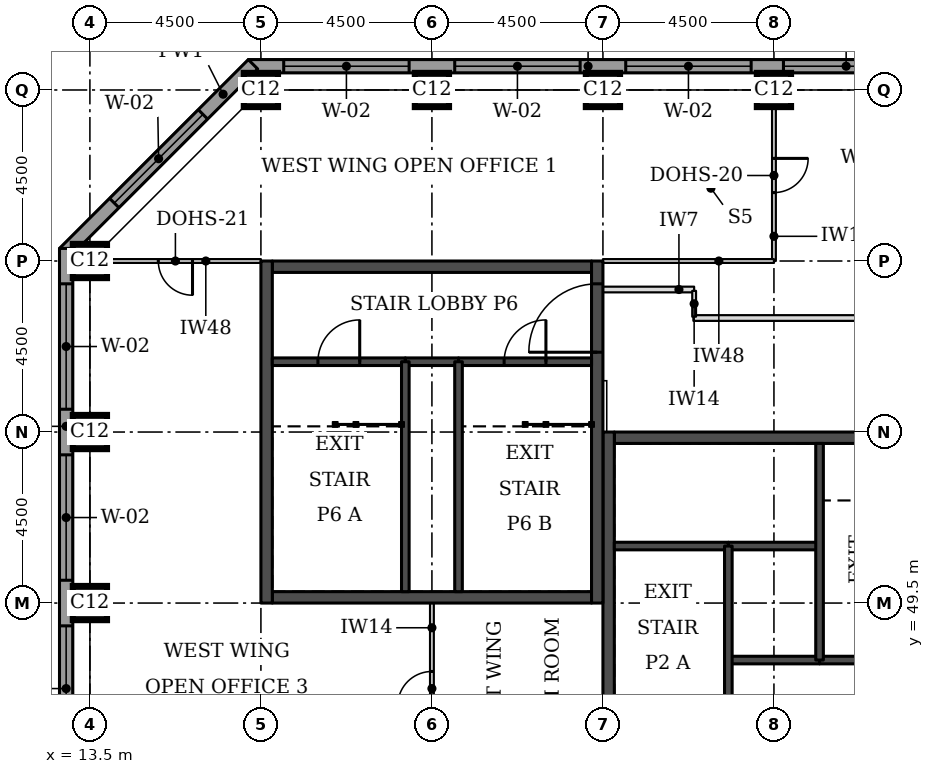
"""IFC4 building model, lengths in metres.
Left out: names, types, materials, properties, quantities, classifications, styles, units other than length and angle.
Written with IfcOpenShell. Run it as: python <this file> out.ifc"""

import sys

from ifc_helpers import new_model, si_unit, direction, frame, frame_2d, origin, origin_2d, place, context, subcontext, project, spatial, rectangle, extrude, element, fill, save


model = new_model("IFC4")
c1 = context("Model", 3, precision=1e-05, world=origin(), true_north=direction((0.0, 1.0)))
c2 = subcontext(c1, "Body", "Model", "MODEL_VIEW")
j1 = project(units=[si_unit("LENGTHUNIT", "METRE"), si_unit("PLANEANGLEUNIT", "RADIAN")], contexts=[c1])
p1 = place(None, origin())
s1 = spatial("IfcSite", under=j1, at=p1, CompositionType="ELEMENT")
p2 = place(p1, origin())
s2 = spatial("IfcBuilding", under=s1, at=p2, CompositionType="ELEMENT")
p3 = place(p2, frame((0.0, 0.0, 260.0)))
s3 = spatial("IfcBuildingStorey", under=s2, at=p3, CompositionType="ELEMENT", Elevation=260.0)
for number, where, z_axis, x_axis in (
    (1, (13.5, 49.5, 0.0), (0.0, 0.0, 1.0), (1.0, 0.0, 0.0)),
    (2, (13.5, 54.0, 0.0), (0.0, 0.0, 1.0), (1.0, 0.0, 0.0)),
    (3, (13.5, 58.5, 0.0), (0.0, 0.0, 1.0), (1.0, 0.0, 0.0)),
    (4, (18.0, 63.0, 0.0), (0.0, 0.0, 1.0), (1.0, 0.0, 0.0)),
    (5, (22.5, 63.0, 0.0), (0.0, 0.0, 1.0), (1.0, 0.0, 0.0)),
    (6, (27.0, 63.0, 0.0), (0.0, 0.0, 1.0), (1.0, 0.0, 0.0)),
    (7, (31.5, 63.0, 0.0), (0.0, 0.0, 1.0), (1.0, 0.0, 0.0)),
):
    element("IfcColumn", number, at=place(p3, frame(where, z_axis=z_axis, x_axis=x_axis)), inside=s3, PredefinedType="COLUMN", context=c2, shape_type="SweptSolid", body=[
        extrude(rectangle(XDim=0.9, YDim=0.9, at=origin_2d()), origin(), (0.0, 0.0, 1.0), 3.7),
    ])
p4 = place(p3, frame((27.3, 53.85, 0.0), z_axis=(0.0, 0.0, 1.0), x_axis=(1.0, 0.0, 0.0)))
e8 = element("IfcWall", 8, at=p4, inside=s3, PredefinedType="SHEAR", context=c2, shape_type="SweptSolid", body=[
    extrude(rectangle(XDim=8.4, YDim=0.3, at=frame_2d((4.2, 0.0))), origin(), (0.0, 0.0, 1.0), 3.7),
])
p5 = place(p4, frame((6.4, 0.0, 0.0)))
e9 = element("IfcOpeningElement", 9, at=p5, cuts=e8, PredefinedType="OPENING", context=c2, shape_type="SweptSolid", body=[
    extrude(rectangle(XDim=1.1, YDim=2.1, at=frame_2d((0.55, 1.05))), frame((0.0, 0.16, 0.0), z_axis=(0.0, -1.0, 0.0), x_axis=(1.0, 0.0, 0.0)), (0.0, 0.0, 1.0), 0.32),
])
p6 = place(p3, frame((27.15, 45.0, 0.0), z_axis=(0.0, 0.0, 1.0), x_axis=(0.0, 1.0, 0.0)))
e10 = element("IfcWall", 10, at=p6, inside=s3, PredefinedType="SHEAR", context=c2, shape_type="SweptSolid", body=[
    extrude(rectangle(XDim=9.0, YDim=0.3, at=frame_2d((4.5, 0.0))), origin(), (0.0, 0.0, 1.0), 3.7),
])
p7 = place(p6, frame((0.4, 0.0, 0.0)))
e11 = element("IfcOpeningElement", 11, at=p7, cuts=e10, PredefinedType="OPENING", context=c2, shape_type="SweptSolid", body=[
    extrude(rectangle(XDim=1.1, YDim=2.1, at=frame_2d((0.55, 1.05))), frame((0.0, 0.16, 0.0), z_axis=(0.0, -1.0, 0.0), x_axis=(1.0, 0.0, 0.0)), (0.0, 0.0, 1.0), 0.32),
])
for number, where, z_axis, x_axis in (
    (12, (18.3, 49.65, 0.0), (0.0, 0.0, 1.0), (1.0, 0.0, 0.0)),
    (13, (18.3, 58.35, 0.0), (0.0, 0.0, 1.0), (1.0, 0.0, 0.0)),
):
    element("IfcWall", number, at=place(p3, frame(where, z_axis=z_axis, x_axis=x_axis)), inside=s3, PredefinedType="SHEAR", context=c2, shape_type="SweptSolid", body=[
        extrude(rectangle(XDim=8.4, YDim=0.3, at=frame_2d((4.2, 0.0))), origin(), (0.0, 0.0, 1.0), 3.7),
    ])
p8 = place(p3, frame((18.15, 49.5, 0.0), z_axis=(0.0, 0.0, 1.0), x_axis=(0.0, 1.0, 0.0)))
e14 = element("IfcWall", 14, at=p8, inside=s3, PredefinedType="SHEAR", context=c2, shape_type="SweptSolid", body=[
    extrude(rectangle(XDim=9.0, YDim=0.3, at=frame_2d((4.5, 0.0))), origin(), (0.0, 0.0, 1.0), 3.7),
])
p9 = place(p3, frame((26.85, 49.5, 0.0), z_axis=(0.0, 0.0, 1.0), x_axis=(0.0, 1.0, 0.0)))
e15 = element("IfcWall", 15, at=p9, inside=s3, PredefinedType="SHEAR", context=c2, shape_type="SweptSolid", body=[
    extrude(rectangle(XDim=9.0, YDim=0.3, at=frame_2d((4.5, 0.0))), origin(), (0.0, 0.0, 1.0), 3.7),
])
p10 = place(p9, frame((6.6, 0.0, 0.0)))
e16 = element("IfcOpeningElement", 16, at=p10, cuts=e15, PredefinedType="OPENING", context=c2, shape_type="SweptSolid", body=[
    extrude(rectangle(XDim=1.8, YDim=2.1, at=frame_2d((0.9, 1.05))), frame((0.0, 0.16, 0.0), z_axis=(0.0, -1.0, 0.0), x_axis=(1.0, 0.0, 0.0)), (0.0, 0.0, 1.0), 0.32),
])
p11 = place(p3, frame((35.55, 63.625, 0.0), z_axis=(0.0, 0.0, 1.0), x_axis=(-1.0, 0.0, 0.0)))
e17 = element("IfcWall", 17, at=p11, inside=s3, PredefinedType="STANDARD", context=c2, shape_type="SweptSolid", body=[
    extrude(rectangle(XDim=17.881, YDim=0.35, at=frame_2d((8.941, 0.0))), origin(), (0.0, 0.0, 1.0), 3.375),
])
p12 = place(p11, frame((0.5, 0.0, 0.9)))
e18 = element("IfcOpeningElement", 18, at=p12, cuts=e17, PredefinedType="OPENING", context=c2, shape_type="SweptSolid", body=[
    extrude(rectangle(XDim=3.3, YDim=1.9, at=frame_2d((1.65, 0.95))), frame((0.0, 0.185, 0.0), z_axis=(0.0, -1.0, 0.0), x_axis=(1.0, 0.0, 0.0)), (0.0, 0.0, 1.0), 0.37),
])
p13 = place(p11, frame((4.65, 0.0, 0.9)))
e19 = element("IfcOpeningElement", 19, at=p13, cuts=e17, PredefinedType="OPENING", context=c2, shape_type="SweptSolid", body=[
    extrude(rectangle(XDim=3.3, YDim=1.9, at=frame_2d((1.65, 0.95))), frame((0.0, 0.185, 0.0), z_axis=(0.0, -1.0, 0.0), x_axis=(1.0, 0.0, 0.0)), (0.0, 0.0, 1.0), 0.37),
])
p14 = place(p11, frame((9.15, 0.0, 0.9)))
e20 = element("IfcOpeningElement", 20, at=p14, cuts=e17, PredefinedType="OPENING", context=c2, shape_type="SweptSolid", body=[
    extrude(rectangle(XDim=3.3, YDim=1.9, at=frame_2d((1.65, 0.95))), frame((0.0, 0.185, 0.0), z_axis=(0.0, -1.0, 0.0), x_axis=(1.0, 0.0, 0.0)), (0.0, 0.0, 1.0), 0.37),
])
p15 = place(p11, frame((13.65, 0.0, 0.9)))
e21 = element("IfcOpeningElement", 21, at=p15, cuts=e17, PredefinedType="OPENING", context=c2, shape_type="SweptSolid", body=[
    extrude(rectangle(XDim=3.3, YDim=1.9, at=frame_2d((1.65, 0.95))), frame((0.0, 0.185, 0.0), z_axis=(0.0, -1.0, 0.0), x_axis=(1.0, 0.0, 0.0)), (0.0, 0.0, 1.0), 0.37),
])
p16 = place(p3, frame((17.792, 63.676, 0.0), z_axis=(0.0, 0.0, 1.0), x_axis=(-0.707106781187, -0.707106781187, 0.0)))
e22 = element("IfcWall", 22, at=p16, inside=s3, PredefinedType="STANDARD", context=c2, shape_type="SweptSolid", body=[
    extrude(rectangle(XDim=7.027, YDim=0.35, at=frame_2d((3.513, 0.0))), origin(), (0.0, 0.0, 1.0), 3.375),
])
p17 = place(p16, frame((1.863, 0.0, 0.9)))
e23 = element("IfcOpeningElement", 23, at=p17, cuts=e22, PredefinedType="OPENING", context=c2, shape_type="SweptSolid", body=[
    extrude(rectangle(XDim=3.3, YDim=1.9, at=frame_2d((1.65, 0.95))), frame((0.0, 0.185, 0.0), z_axis=(0.0, -1.0, 0.0), x_axis=(1.0, 0.0, 0.0)), (0.0, 0.0, 1.0), 0.37),
])
p18 = place(p3, frame((12.875, 58.831, 0.0), z_axis=(0.0, 0.0, 1.0), x_axis=(0.0, -1.0, 0.0)))
e24 = element("IfcWall", 24, at=p18, inside=s3, PredefinedType="STANDARD", context=c2, shape_type="SweptSolid", body=[
    extrude(rectangle(XDim=14.163, YDim=0.35, at=frame_2d((7.081, 0.0))), origin(), (0.0, 0.0, 1.0), 3.375),
])
p19 = place(p18, frame((0.931, 0.0, 0.9)))
e25 = element("IfcOpeningElement", 25, at=p19, cuts=e24, PredefinedType="OPENING", context=c2, shape_type="SweptSolid", body=[
    extrude(rectangle(XDim=3.3, YDim=1.9, at=frame_2d((1.65, 0.95))), frame((0.0, 0.185, 0.0), z_axis=(0.0, -1.0, 0.0), x_axis=(1.0, 0.0, 0.0)), (0.0, 0.0, 1.0), 0.37),
])
p20 = place(p18, frame((5.431, 0.0, 0.9)))
e26 = element("IfcOpeningElement", 26, at=p20, cuts=e24, PredefinedType="OPENING", context=c2, shape_type="SweptSolid", body=[
    extrude(rectangle(XDim=3.3, YDim=1.9, at=frame_2d((1.65, 0.95))), frame((0.0, 0.185, 0.0), z_axis=(0.0, -1.0, 0.0), x_axis=(1.0, 0.0, 0.0)), (0.0, 0.0, 1.0), 0.37),
])
p21 = place(p18, frame((9.931, 0.0, 0.9)))
e27 = element("IfcOpeningElement", 27, at=p21, cuts=e24, PredefinedType="OPENING", context=c2, shape_type="SweptSolid", body=[
    extrude(rectangle(XDim=3.3, YDim=1.9, at=frame_2d((1.65, 0.95))), frame((0.0, 0.185, 0.0), z_axis=(0.0, -1.0, 0.0), x_axis=(1.0, 0.0, 0.0)), (0.0, 0.0, 1.0), 0.37),
])
p22 = place(p3, frame((29.38, 57.0, 0.0), z_axis=(0.0, 0.0, 1.0), x_axis=(1.0, 0.0, 0.0)))
e28 = element("IfcWall", 28, at=p22, inside=s3, PredefinedType="PARTITIONING", context=c2, shape_type="SweptSolid", body=[
    extrude(rectangle(XDim=12.695, YDim=0.15, at=frame_2d((6.348, 0.0))), origin(), (0.0, 0.0, 1.0), 3.45),
])
p23 = place(p22, frame((5.13, 0.0, 0.0)))
e29 = element("IfcOpeningElement", 29, at=p23, cuts=e28, PredefinedType="OPENING", context=c2, shape_type="SweptSolid", body=[
    extrude(rectangle(XDim=1.0, YDim=2.1, at=frame_2d((0.5, 1.05))), frame((0.0, 0.085, 0.0), z_axis=(0.0, -1.0, 0.0), x_axis=(1.0, 0.0, 0.0)), (0.0, 0.0, 1.0), 0.17),
])
p24 = place(p3, frame((31.5, 63.0, 0.0), z_axis=(0.0, 0.0, 1.0), x_axis=(0.0, -1.0, 0.0)))
e30 = element("IfcWall", 30, at=p24, inside=s3, PredefinedType="PARTITIONING", context=c2, shape_type="SweptSolid", body=[
    extrude(rectangle(XDim=4.5, YDim=0.1, at=frame_2d((2.25, 0.0))), origin(), (0.0, 0.0, 1.0), 3.45),
])
p25 = place(p24, frame((1.8, 0.0, 0.0)))
e31 = element("IfcOpeningElement", 31, at=p25, cuts=e30, PredefinedType="OPENING", context=c2, shape_type="SweptSolid", body=[
    extrude(rectangle(XDim=0.9, YDim=2.1, at=frame_2d((0.45, 1.05))), frame((0.0, 0.06, 0.0), z_axis=(0.0, -1.0, 0.0), x_axis=(1.0, 0.0, 0.0)), (0.0, 0.0, 1.0), 0.12),
])
p26 = place(p3, frame((31.5, 58.5, 0.0), z_axis=(0.0, 0.0, 1.0), x_axis=(-1.0, 0.0, 0.0)))
e32 = element("IfcWall", 32, at=p26, inside=s3, PredefinedType="PARTITIONING", context=c2, shape_type="SweptSolid", body=[
    extrude(rectangle(XDim=4.5, YDim=0.1, at=frame_2d((2.25, 0.0))), origin(), (0.0, 0.0, 1.0), 2.4),
])
p27 = place(p3, frame((13.5, 58.5, 0.0), z_axis=(0.0, 0.0, 1.0), x_axis=(1.0, 0.0, 0.0)))
e33 = element("IfcWall", 33, at=p27, inside=s3, PredefinedType="PARTITIONING", context=c2, shape_type="SweptSolid", body=[
    extrude(rectangle(XDim=4.5, YDim=0.1, at=frame_2d((2.25, 0.0))), origin(), (0.0, 0.0, 1.0), 2.4),
])
p28 = place(p27, frame((1.8, 0.0, 0.0)))
e34 = element("IfcOpeningElement", 34, at=p28, cuts=e33, PredefinedType="OPENING", context=c2, shape_type="SweptSolid", body=[
    extrude(rectangle(XDim=0.9, YDim=2.1, at=frame_2d((0.45, 1.05))), frame((0.0, 0.06, 0.0), z_axis=(0.0, -1.0, 0.0), x_axis=(1.0, 0.0, 0.0)), (0.0, 0.0, 1.0), 0.12),
])
p29 = place(p3, frame((22.5, 49.5, 0.0), z_axis=(0.0, 0.0, 1.0), x_axis=(0.0, -1.0, 0.0)))
e35 = element("IfcWall", 35, at=p29, inside=s3, PredefinedType="PARTITIONING", context=c2, shape_type="SweptSolid", body=[
    extrude(rectangle(XDim=4.5, YDim=0.1, at=frame_2d((2.25, 0.0))), origin(), (0.0, 0.0, 1.0), 3.45),
])
p30 = place(p29, frame((1.8, 0.0, 0.0)))
e36 = element("IfcOpeningElement", 36, at=p30, cuts=e35, PredefinedType="OPENING", context=c2, shape_type="SweptSolid", body=[
    extrude(rectangle(XDim=0.9, YDim=2.1, at=frame_2d((0.45, 1.05))), frame((0.0, 0.06, 0.0), z_axis=(0.0, -1.0, 0.0), x_axis=(1.0, 0.0, 0.0)), (0.0, 0.0, 1.0), 0.12),
])
p31 = place(p3, frame((27.0, 57.75, 0.0), z_axis=(0.0, 0.0, 1.0), x_axis=(1.0, 0.0, 0.0)))
e37 = element("IfcWall", 37, at=p31, inside=s3, PredefinedType="PARTITIONING", context=c2, shape_type="SweptSolid", body=[
    extrude(rectangle(XDim=2.4, YDim=0.15, at=frame_2d((1.2, 0.0))), origin(), (0.0, 0.0, 1.0), 3.45),
])
p32 = place(p3, frame((29.4, 57.715, 0.0), z_axis=(0.0, 0.0, 1.0), x_axis=(0.0, -1.0, 0.0)))
e38 = element("IfcWall", 38, at=p32, inside=s3, PredefinedType="PARTITIONING", context=c2, shape_type="SweptSolid", body=[
    extrude(rectangle(XDim=0.68, YDim=0.1, at=frame_2d((0.34, 0.0))), origin(), (0.0, 0.0, 1.0), 3.45),
])
p33 = place(p3, frame((30.3, 48.0, 0.0), z_axis=(0.0, 0.0, 1.0), x_axis=(1.0, 0.0, 0.0)))
e39 = element("IfcWall", 39, at=p33, inside=s3, PredefinedType="SOLIDWALL", context=c2, shape_type="SweptSolid", body=[
    extrude(rectangle(XDim=2.4, YDim=0.2, at=frame_2d((1.2, 0.0))), origin(), (0.0, 0.0, 1.0), 3.45),
])
p34 = place(p3, frame((32.7, 48.0, 0.0), z_axis=(0.0, 0.0, 1.0), x_axis=(1.0, 0.0, 0.0)))
e40 = element("IfcWall", 40, at=p34, inside=s3, PredefinedType="SOLIDWALL", context=c2, shape_type="SweptSolid", body=[
    extrude(rectangle(XDim=3.0, YDim=0.2, at=frame_2d((1.5, 0.0))), origin(), (0.0, 0.0, 1.0), 3.45),
])
p35 = place(p3, frame((30.3, 51.0, 0.0), z_axis=(0.0, 0.0, 1.0), x_axis=(1.0, 0.0, 0.0)))
e41 = element("IfcWall", 41, at=p35, inside=s3, PredefinedType="SOLIDWALL", context=c2, shape_type="SweptSolid", body=[
    extrude(rectangle(XDim=2.4, YDim=0.2, at=frame_2d((1.2, 0.0))), origin(), (0.0, 0.0, 1.0), 3.45),
])
p36 = place(p3, frame((27.3, 51.0, 0.0), z_axis=(0.0, 0.0, 1.0), x_axis=(1.0, 0.0, 0.0)))
e42 = element("IfcWall", 42, at=p36, inside=s3, PredefinedType="SOLIDWALL", context=c2, shape_type="SweptSolid", body=[
    extrude(rectangle(XDim=3.0, YDim=0.2, at=frame_2d((1.5, 0.0))), origin(), (0.0, 0.0, 1.0), 3.45),
])
for number, where, z_axis, x_axis in (
    (43, (30.3, 45.3, 0.0), (0.0, 0.0, 1.0), (0.0, 1.0, 0.0)),
    (44, (32.7, 48.0, 0.0), (0.0, 0.0, 1.0), (0.0, 1.0, 0.0)),
):
    element("IfcWall", number, at=place(p3, frame(where, z_axis=z_axis, x_axis=x_axis)), inside=s3, PredefinedType="SOLIDWALL", context=c2, shape_type="SweptSolid", body=[
        extrude(rectangle(XDim=5.7, YDim=0.2, at=frame_2d((2.85, 0.0))), origin(), (0.0, 0.0, 1.0), 3.45),
    ])
p37 = place(p3, frame((21.8, 55.85, 0.0), z_axis=(0.0, 0.0, 1.0), x_axis=(1.0, 0.0, 0.0)))
e45 = element("IfcWall", 45, at=p37, inside=s3, PredefinedType="SOLIDWALL", context=c2, shape_type="SweptSolid", body=[
    extrude(rectangle(XDim=1.4, YDim=0.2, at=frame_2d((0.7, 0.0))), origin(), (0.0, 0.0, 1.0), 3.45),
])
p38 = place(p3, frame((18.3, 55.85, 0.0), z_axis=(0.0, 0.0, 1.0), x_axis=(1.0, 0.0, 0.0)))
e46 = element("IfcWall", 46, at=p38, inside=s3, PredefinedType="SOLIDWALL", context=c2, shape_type="SweptSolid", body=[
    extrude(rectangle(XDim=3.5, YDim=0.2, at=frame_2d((1.75, 0.0))), origin(), (0.0, 0.0, 1.0), 3.45),
])
p39 = place(p38, frame((1.2, 0.0, 0.0)))
e47 = element("IfcOpeningElement", 47, at=p39, cuts=e46, PredefinedType="OPENING", context=c2, shape_type="SweptSolid", body=[
    extrude(rectangle(XDim=1.1, YDim=2.1, at=frame_2d((0.55, 1.05))), frame((0.0, 0.11, 0.0), z_axis=(0.0, -1.0, 0.0), x_axis=(1.0, 0.0, 0.0)), (0.0, 0.0, 1.0), 0.22),
])
p40 = place(p3, frame((23.2, 55.85, 0.0), z_axis=(0.0, 0.0, 1.0), x_axis=(1.0, 0.0, 0.0)))
e48 = element("IfcWall", 48, at=p40, inside=s3, PredefinedType="SOLIDWALL", context=c2, shape_type="SweptSolid", body=[
    extrude(rectangle(XDim=3.5, YDim=0.2, at=frame_2d((1.75, 0.0))), origin(), (0.0, 0.0, 1.0), 3.45),
])
p41 = place(p40, frame((1.2, 0.0, 0.0)))
e49 = element("IfcOpeningElement", 49, at=p41, cuts=e48, PredefinedType="OPENING", context=c2, shape_type="SweptSolid", body=[
    extrude(rectangle(XDim=1.1, YDim=2.1, at=frame_2d((0.55, 1.05))), frame((0.0, 0.11, 0.0), z_axis=(0.0, -1.0, 0.0), x_axis=(1.0, 0.0, 0.0)), (0.0, 0.0, 1.0), 0.22),
])
for number, where, z_axis, x_axis in (
    (50, (21.8, 49.8, 0.0), (0.0, 0.0, 1.0), (0.0, 1.0, 0.0)),
    (51, (23.2, 49.8, 0.0), (0.0, 0.0, 1.0), (0.0, 1.0, 0.0)),
):
    element("IfcWall", number, at=place(p3, frame(where, z_axis=z_axis, x_axis=x_axis)), inside=s3, PredefinedType="SOLIDWALL", context=c2, shape_type="SweptSolid", body=[
        extrude(rectangle(XDim=6.05, YDim=0.2, at=frame_2d((3.025, 0.0))), origin(), (0.0, 0.0, 1.0), 3.45),
    ])
p42 = place(p12, origin())
e52 = element("IfcWindow", 52, at=p42, inside=s3, PartitioningType="SINGLE_PANEL", PredefinedType="WINDOW", context=c2, shape_type="SweptSolid", body=[
    extrude(rectangle(XDim=3.3, YDim=1.9, at=frame_2d((1.65, 0.95))), frame((0.0, 0.085, 0.0), z_axis=(0.0, -1.0, 0.0), x_axis=(1.0, 0.0, 0.0)), (0.0, 0.0, 1.0), 0.06),
])
fill(e18, e52)
p43 = place(p13, origin())
e53 = element("IfcWindow", 53, at=p43, inside=s3, PartitioningType="SINGLE_PANEL", PredefinedType="WINDOW", context=c2, shape_type="SweptSolid", body=[
    extrude(rectangle(XDim=3.3, YDim=1.9, at=frame_2d((1.65, 0.95))), frame((0.0, 0.085, 0.0), z_axis=(0.0, -1.0, 0.0), x_axis=(1.0, 0.0, 0.0)), (0.0, 0.0, 1.0), 0.06),
])
fill(e19, e53)
p44 = place(p14, origin())
e54 = element("IfcWindow", 54, at=p44, inside=s3, PartitioningType="SINGLE_PANEL", PredefinedType="WINDOW", context=c2, shape_type="SweptSolid", body=[
    extrude(rectangle(XDim=3.3, YDim=1.9, at=frame_2d((1.65, 0.95))), frame((0.0, 0.085, 0.0), z_axis=(0.0, -1.0, 0.0), x_axis=(1.0, 0.0, 0.0)), (0.0, 0.0, 1.0), 0.06),
])
fill(e20, e54)
p45 = place(p15, origin())
e55 = element("IfcWindow", 55, at=p45, inside=s3, PartitioningType="SINGLE_PANEL", PredefinedType="WINDOW", context=c2, shape_type="SweptSolid", body=[
    extrude(rectangle(XDim=3.3, YDim=1.9, at=frame_2d((1.65, 0.95))), frame((0.0, 0.085, 0.0), z_axis=(0.0, -1.0, 0.0), x_axis=(1.0, 0.0, 0.0)), (0.0, 0.0, 1.0), 0.06),
])
fill(e21, e55)
p46 = place(p17, origin())
e56 = element("IfcWindow", 56, at=p46, inside=s3, PartitioningType="SINGLE_PANEL", PredefinedType="WINDOW", context=c2, shape_type="SweptSolid", body=[
    extrude(rectangle(XDim=3.3, YDim=1.9, at=frame_2d((1.65, 0.95))), frame((0.0, 0.085, 0.0), z_axis=(0.0, -1.0, 0.0), x_axis=(1.0, 0.0, 0.0)), (0.0, 0.0, 1.0), 0.06),
])
fill(e23, e56)
p47 = place(p19, origin())
e57 = element("IfcWindow", 57, at=p47, inside=s3, PartitioningType="SINGLE_PANEL", PredefinedType="WINDOW", context=c2, shape_type="SweptSolid", body=[
    extrude(rectangle(XDim=3.3, YDim=1.9, at=frame_2d((1.65, 0.95))), frame((0.0, 0.085, 0.0), z_axis=(0.0, -1.0, 0.0), x_axis=(1.0, 0.0, 0.0)), (0.0, 0.0, 1.0), 0.06),
])
fill(e25, e57)
p48 = place(p20, origin())
e58 = element("IfcWindow", 58, at=p48, inside=s3, PartitioningType="SINGLE_PANEL", PredefinedType="WINDOW", context=c2, shape_type="SweptSolid", body=[
    extrude(rectangle(XDim=3.3, YDim=1.9, at=frame_2d((1.65, 0.95))), frame((0.0, 0.085, 0.0), z_axis=(0.0, -1.0, 0.0), x_axis=(1.0, 0.0, 0.0)), (0.0, 0.0, 1.0), 0.06),
])
fill(e26, e58)
p49 = place(p21, origin())
e59 = element("IfcWindow", 59, at=p49, inside=s3, PartitioningType="SINGLE_PANEL", PredefinedType="WINDOW", context=c2, shape_type="SweptSolid", body=[
    extrude(rectangle(XDim=3.3, YDim=1.9, at=frame_2d((1.65, 0.95))), frame((0.0, 0.085, 0.0), z_axis=(0.0, -1.0, 0.0), x_axis=(1.0, 0.0, 0.0)), (0.0, 0.0, 1.0), 0.06),
])
fill(e27, e59)
p50 = place(p25, origin())
e60 = element("IfcDoor", 60, at=p50, inside=s3, OperationType="SINGLE_SWING_LEFT", PredefinedType="DOOR", context=c2, shape_type="SweptSolid", body=[
    extrude(rectangle(XDim=0.9, YDim=2.1, at=frame_2d((0.45, 1.05))), frame((0.0, 0.025, 0.0), z_axis=(0.0, -1.0, 0.0), x_axis=(1.0, 0.0, 0.0)), (0.0, 0.0, 1.0), 0.05),
])
fill(e31, e60)
p51 = place(p28, frame((0.9, 0.0, 0.0), z_axis=(0.0, 0.0, 1.0), x_axis=(-1.0, 0.0, 0.0)))
e61 = element("IfcDoor", 61, at=p51, inside=s3, OperationType="SINGLE_SWING_LEFT", PredefinedType="DOOR", context=c2, shape_type="SweptSolid", body=[
    extrude(rectangle(XDim=0.9, YDim=2.1, at=frame_2d((0.45, 1.05))), frame((0.0, 0.025, 0.0), z_axis=(0.0, -1.0, 0.0), x_axis=(1.0, 0.0, 0.0)), (0.0, 0.0, 1.0), 0.05),
])
fill(e34, e61)
p52 = place(p30, frame((0.9, 0.0, 0.0), z_axis=(0.0, 0.0, 1.0), x_axis=(-1.0, 0.0, 0.0)))
e62 = element("IfcDoor", 62, at=p52, inside=s3, OperationType="SINGLE_SWING_LEFT", PredefinedType="DOOR", context=c2, shape_type="SweptSolid", body=[
    extrude(rectangle(XDim=0.9, YDim=2.1, at=frame_2d((0.45, 1.05))), frame((0.0, 0.025, 0.0), z_axis=(0.0, -1.0, 0.0), x_axis=(1.0, 0.0, 0.0)), (0.0, 0.0, 1.0), 0.05),
])
fill(e36, e62)
p53 = place(p39, origin())
e63 = element("IfcDoor", 63, at=p53, inside=s3, OperationType="SINGLE_SWING_RIGHT", PredefinedType="DOOR", context=c2, shape_type="SweptSolid", body=[
    extrude(rectangle(XDim=1.1, YDim=2.1, at=frame_2d((0.55, 1.05))), frame((0.0, 0.025, 0.0), z_axis=(0.0, -1.0, 0.0), x_axis=(1.0, 0.0, 0.0)), (0.0, 0.0, 1.0), 0.05),
])
fill(e47, e63)
p54 = place(p41, origin())
e64 = element("IfcDoor", 64, at=p54, inside=s3, OperationType="SINGLE_SWING_RIGHT", PredefinedType="DOOR", context=c2, shape_type="SweptSolid", body=[
    extrude(rectangle(XDim=1.1, YDim=2.1, at=frame_2d((0.55, 1.05))), frame((0.0, 0.025, 0.0), z_axis=(0.0, -1.0, 0.0), x_axis=(1.0, 0.0, 0.0)), (0.0, 0.0, 1.0), 0.05),
])
fill(e49, e64)
p55 = place(p10, origin())
e65 = element("IfcDoor", 65, at=p55, inside=s3, OperationType="SINGLE_SWING_LEFT", PredefinedType="DOOR", context=c2, shape_type="SweptSolid", body=[
    extrude(rectangle(XDim=1.8, YDim=2.1, at=frame_2d((0.9, 1.05))), frame((0.0, 0.025, 0.0), z_axis=(0.0, -1.0, 0.0), x_axis=(1.0, 0.0, 0.0)), (0.0, 0.0, 1.0), 0.05),
])
fill(e16, e65)
save(model, sys.argv[1])
